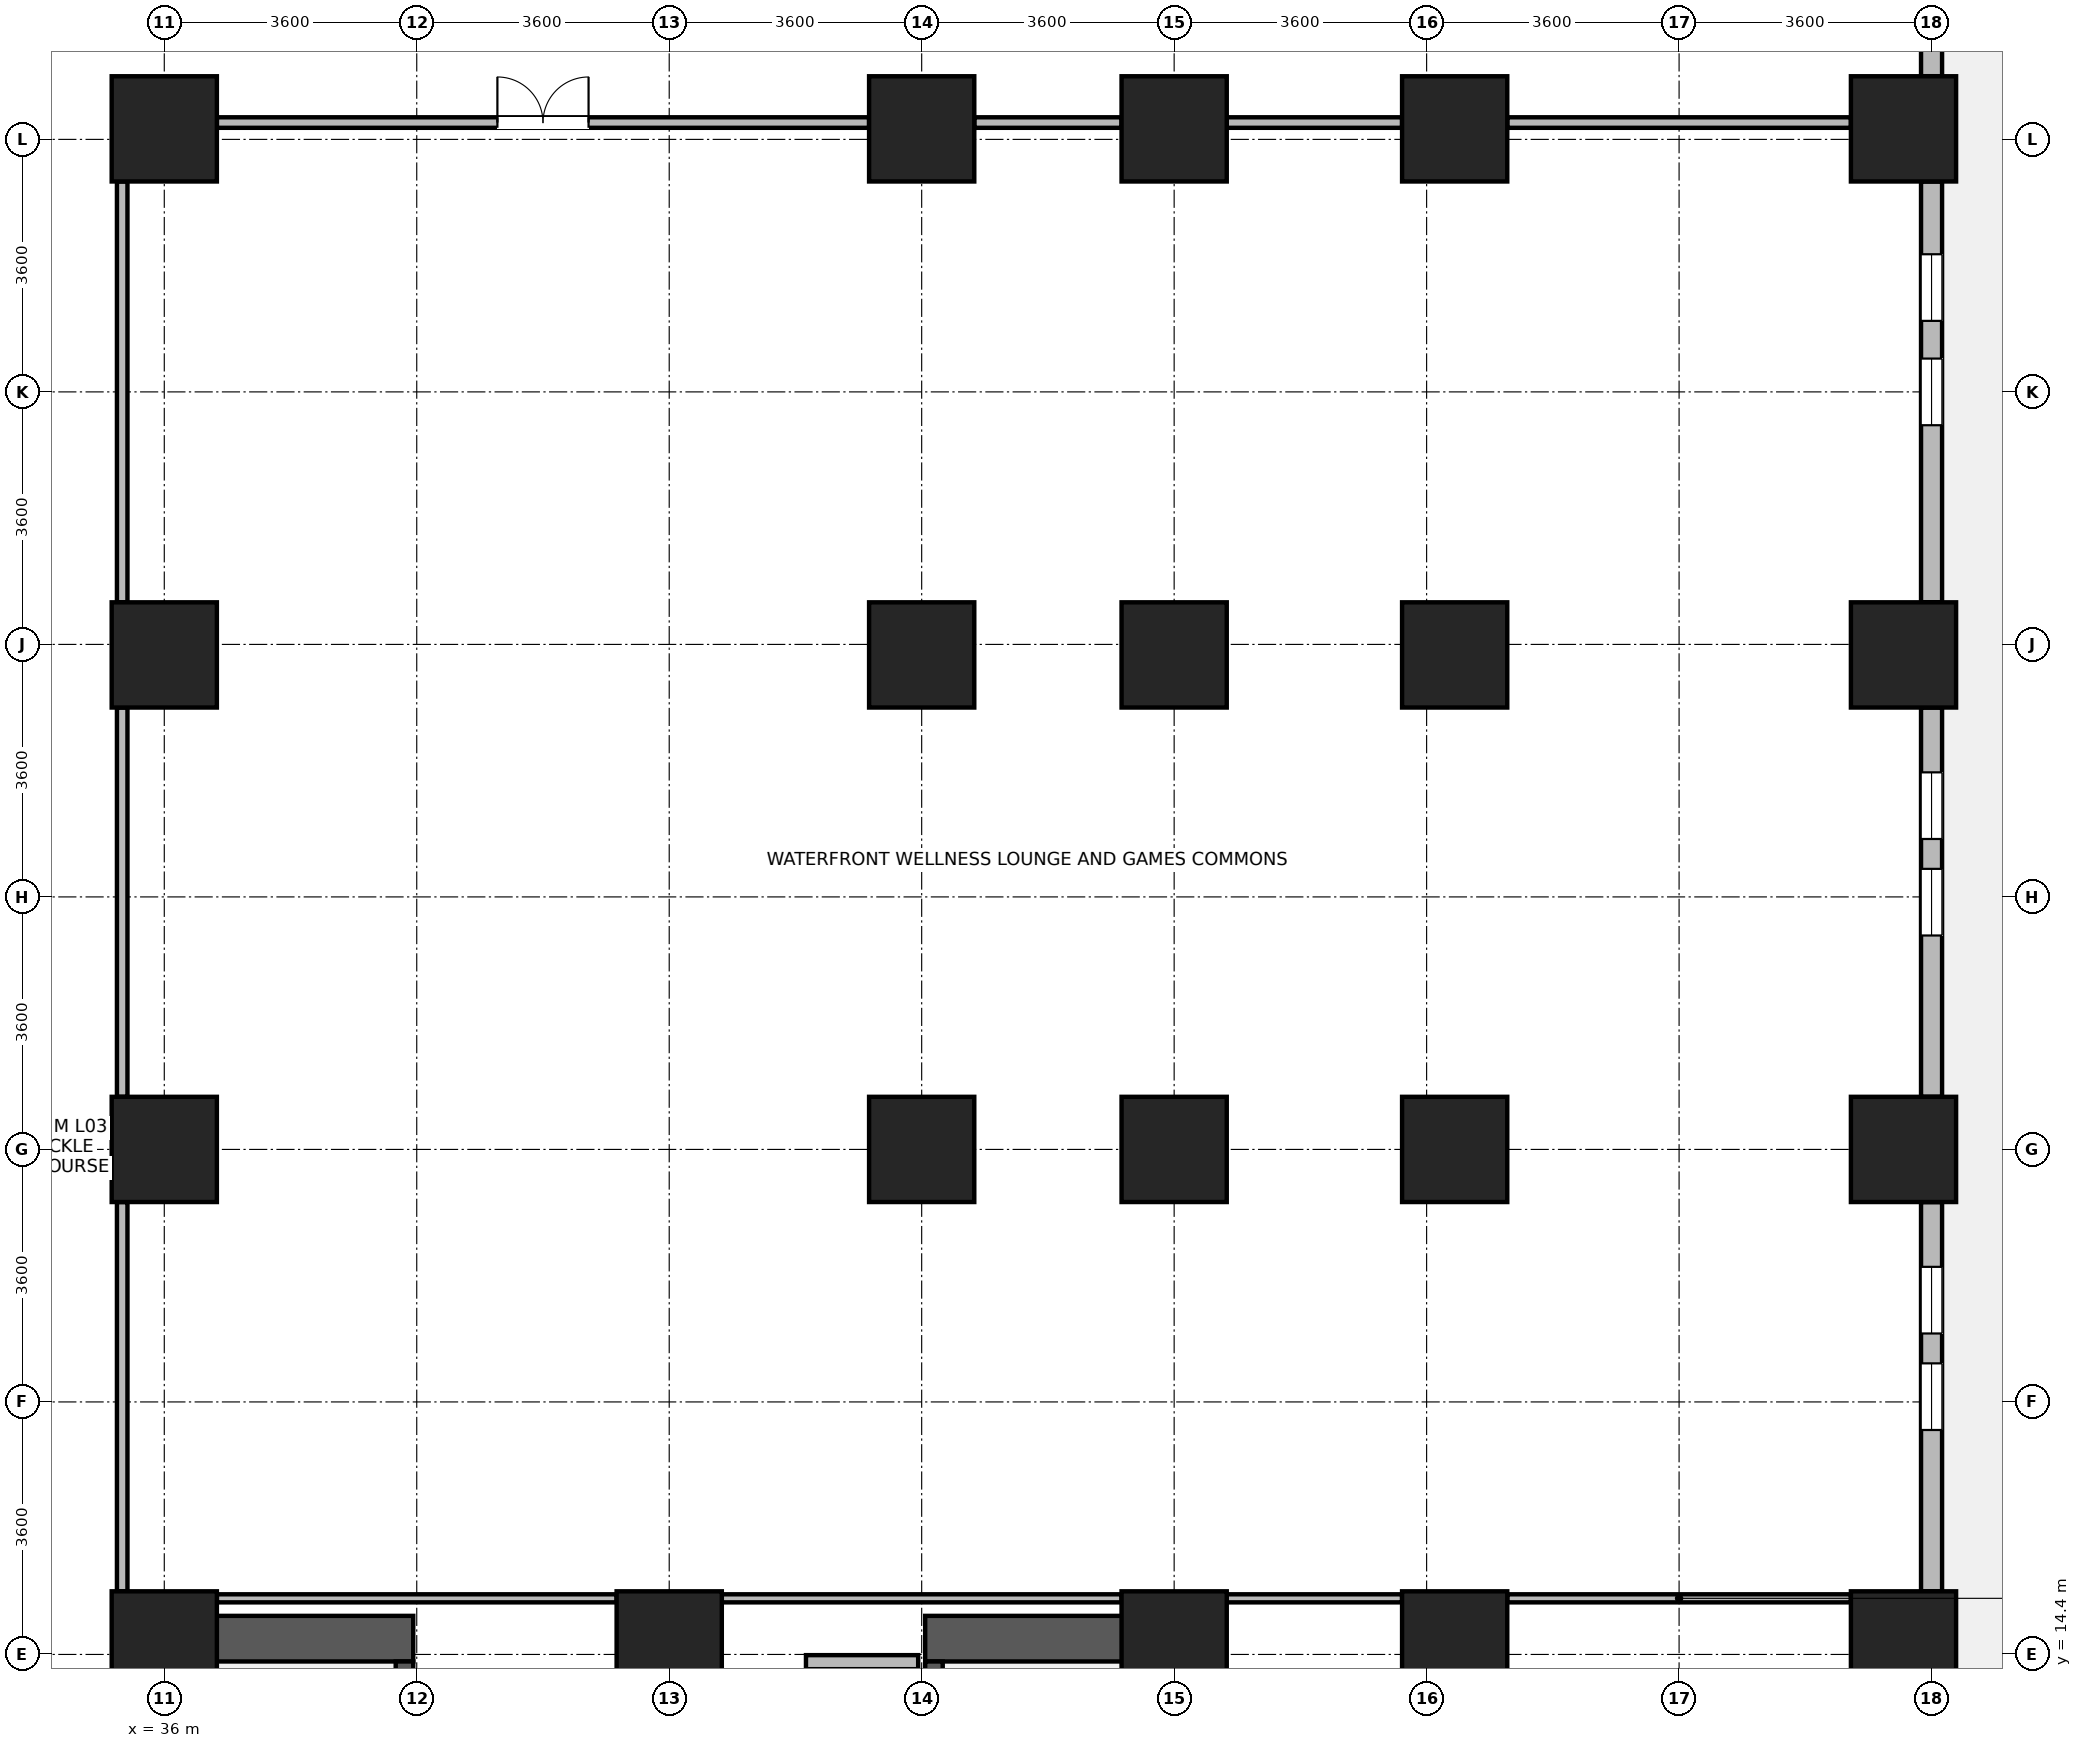
"""IFC4 building model, lengths in metres.
Left out: names, types, materials, properties, quantities, classifications, styles, units other than length and angle.
Written with IfcOpenShell. Run it as: python <this file> out.ifc"""

import sys

from ifc_helpers import new_model, si_unit, direction, frame, frame_2d, origin, origin_2d, place, context, subcontext, project, spatial, rectangle, extrude, source, transform, mapped, element, fill, save


model = new_model("IFC4")
c1 = context("Model", 3, precision=1e-05, world=origin(), true_north=direction((0.0, 1.0)))
c2 = subcontext(c1, "Body", "Model", "MODEL_VIEW")
j1 = project(units=[si_unit("LENGTHUNIT", "METRE"), si_unit("PLANEANGLEUNIT", "RADIAN")], contexts=[c1])
p1 = place(None, origin())
s1 = spatial("IfcSite", under=j1, at=p1, CompositionType="ELEMENT")
p2 = place(p1, origin())
s2 = spatial("IfcBuilding", under=s1, at=p2, CompositionType="ELEMENT")
p3 = place(p2, frame((0.0, 0.0, 15.0)))
s3 = spatial("IfcBuildingStorey", under=s2, at=p3, CompositionType="ELEMENT", Elevation=15.0)
for number, where, z_axis, x_axis in (
    (1, (36.025, 6.65, 0.0), (0.0, 0.0, 1.0), (0.0, 1.0, 0.0)),
    (2, (50.375, 6.65, 0.0), (0.0, 0.0, 1.0), (0.0, 1.0, 0.0)),
):
    element("IfcWall", number, at=place(p3, frame(where, z_axis=z_axis, x_axis=x_axis)), inside=s3, PredefinedType="SHEAR", context=c2, shape_type="SweptSolid", body=[
        extrude(rectangle(XDim=8.3, YDim=0.65, at=frame_2d((4.15, 0.0))), origin(), (0.0, 0.0, 1.0), 4.38),
    ])
for number, where, z_axis, x_axis in (
    (3, (36.35, 14.625, 0.0), (0.0, 0.0, 1.0), (1.0, 0.0, 0.0)),
    (4, (46.85, 14.625, 0.0), (0.0, 0.0, 1.0), (1.0, 0.0, 0.0)),
):
    element("IfcWall", number, at=place(p3, frame(where, z_axis=z_axis, x_axis=x_axis)), inside=s3, PredefinedType="SHEAR", context=c2, shape_type="SweptSolid", body=[
        extrude(rectangle(XDim=3.2, YDim=0.65, at=frame_2d((1.6, 0.0))), origin(), (0.0, 0.0, 1.0), 4.38),
    ])
p4 = place(p3, frame((39.425, 7.3, 0.0), z_axis=(0.0, 0.0, 1.0), x_axis=(0.0, 1.0, 0.0)))
e5 = element("IfcWall", 5, at=p4, inside=s3, PredefinedType="SHEAR", context=c2, shape_type="SweptSolid", body=[
    extrude(rectangle(XDim=7.0, YDim=0.25, at=frame_2d((3.5, 0.0))), origin(), (0.0, 0.0, 1.0), 4.38),
])
p5 = place(p4, frame((0.15, 0.0, 0.0)))
e6 = element("IfcOpeningElement", 6, at=p5, cuts=e5, PredefinedType="OPENING", context=c2, shape_type="SweptSolid", body=[
    extrude(rectangle(XDim=1.1, YDim=2.08, at=frame_2d((0.55, 1.04))), frame((0.0, 0.135, 0.0), z_axis=(0.0, -1.0, 0.0), x_axis=(1.0, 0.0, 0.0)), (0.0, 0.0, 1.0), 0.27),
])
p6 = place(p3, frame((46.975, 7.3, 0.0), z_axis=(0.0, 0.0, 1.0), x_axis=(0.0, 1.0, 0.0)))
e7 = element("IfcWall", 7, at=p6, inside=s3, PredefinedType="SHEAR", context=c2, shape_type="SweptSolid", body=[
    extrude(rectangle(XDim=7.0, YDim=0.25, at=frame_2d((3.5, 0.0))), origin(), (0.0, 0.0, 1.0), 4.38),
])
p7 = place(p6, frame((0.15, 0.0, 0.0)))
e8 = element("IfcOpeningElement", 8, at=p7, cuts=e7, PredefinedType="OPENING", context=c2, shape_type="SweptSolid", body=[
    extrude(rectangle(XDim=1.1, YDim=2.08, at=frame_2d((0.55, 1.04))), frame((0.0, 0.135, 0.0), z_axis=(0.0, -1.0, 0.0), x_axis=(1.0, 0.0, 0.0)), (0.0, 0.0, 1.0), 0.27),
])
m1 = source(origin(), c2, "Body", "SweptSolid", [
    extrude(rectangle(XDim=1.5, YDim=1.5, at=origin_2d()), origin(), (0.0, 0.0, 1.0), 4.8),
])
for number, where, z_axis, x_axis in (
    (9, (36.0, 21.6, 0.0), (0.0, 0.0, 1.0), (1.0, 0.0, 0.0)),
    (10, (36.0, 28.65, 0.0), (0.0, 0.0, 1.0), (1.0, 0.0, 0.0)),
    (11, (36.0, 36.15, 0.0), (0.0, 0.0, 1.0), (1.0, 0.0, 0.0)),
    (12, (46.8, 21.6, 0.0), (0.0, 0.0, 1.0), (1.0, 0.0, 0.0)),
    (13, (46.8, 28.65, 0.0), (0.0, 0.0, 1.0), (1.0, 0.0, 0.0)),
    (14, (46.8, 36.15, 0.0), (0.0, 0.0, 1.0), (1.0, 0.0, 0.0)),
    (15, (36.0, 14.55, 0.0), (0.0, 0.0, 1.0), (1.0, 0.0, 0.0)),
    (16, (43.2, 14.55, 0.0), (0.0, 0.0, 1.0), (1.0, 0.0, 0.0)),
    (17, (50.4, 14.55, 0.0), (0.0, 0.0, 1.0), (1.0, 0.0, 0.0)),
    (18, (50.4, 21.6, 0.0), (0.0, 0.0, 1.0), (1.0, 0.0, 0.0)),
    (19, (50.4, 28.65, 0.0), (0.0, 0.0, 1.0), (1.0, 0.0, 0.0)),
    (20, (50.4, 36.15, 0.0), (0.0, 0.0, 1.0), (1.0, 0.0, 0.0)),
    (21, (54.4, 14.55, 0.0), (0.0, 0.0, 1.0), (1.0, 0.0, 0.0)),
    (22, (54.4, 21.6, 0.0), (0.0, 0.0, 1.0), (1.0, 0.0, 0.0)),
    (23, (54.4, 28.65, 0.0), (0.0, 0.0, 1.0), (1.0, 0.0, 0.0)),
    (24, (54.4, 36.15, 0.0), (0.0, 0.0, 1.0), (1.0, 0.0, 0.0)),
    (25, (60.8, 36.15, 0.0), (0.0, 0.0, 1.0), (1.0, 0.0, 0.0)),
    (26, (60.8, 28.65, 0.0), (0.0, 0.0, 1.0), (1.0, 0.0, 0.0)),
    (27, (60.8, 21.6, 0.0), (0.0, 0.0, 1.0), (1.0, 0.0, 0.0)),
    (28, (60.8, 14.55, 0.0), (0.0, 0.0, 1.0), (1.0, 0.0, 0.0)),
):
    element("IfcColumn", number, at=place(p3, frame(where, z_axis=z_axis, x_axis=x_axis)), inside=s3, PredefinedType="COLUMN", context=c2, shape_type="MappedRepresentation", body=[
        mapped(m1, transform((0.0, 0.0, 0.0), x_axis=(1.0, 0.0, 0.0), y_axis=(0.0, 1.0, 0.0), z_axis=(0.0, 0.0, 1.0), scale=1.0)),
    ])
p8 = place(p3, frame((61.2, 20.849, 0.0), z_axis=(0.0, 0.0, 1.0), x_axis=(0.0, -1.0, 0.0)))
e29 = element("IfcWall", 29, at=p8, inside=s3, PredefinedType="STANDARD", context=c2, shape_type="SweptSolid", body=[
    extrude(rectangle(XDim=5.548, YDim=0.3, at=frame_2d((2.774, 0.0))), origin(), (0.0, 0.0, 1.0), 4.36),
])
p9 = place(p8, frame((2.299, 0.0, 0.9)))
e30 = element("IfcOpeningElement", 30, at=p9, cuts=e29, PredefinedType="OPENING", context=c2, shape_type="SweptSolid", body=[
    extrude(rectangle(XDim=0.95, YDim=1.75, at=frame_2d((0.475, 0.875))), frame((0.0, 0.16, 0.0), z_axis=(0.0, -1.0, 0.0), x_axis=(1.0, 0.0, 0.0)), (0.0, 0.0, 1.0), 0.32),
])
p10 = place(p8, frame((0.923, 0.0, 0.9)))
e31 = element("IfcOpeningElement", 31, at=p10, cuts=e29, PredefinedType="OPENING", context=c2, shape_type="SweptSolid", body=[
    extrude(rectangle(XDim=0.95, YDim=1.75, at=frame_2d((0.475, 0.875))), frame((0.0, 0.16, 0.0), z_axis=(0.0, -1.0, 0.0), x_axis=(1.0, 0.0, 0.0)), (0.0, 0.0, 1.0), 0.32),
])
p11 = place(p3, frame((61.2, 27.899, 0.0), z_axis=(0.0, 0.0, 1.0), x_axis=(0.0, -1.0, 0.0)))
e32 = element("IfcWall", 32, at=p11, inside=s3, PredefinedType="STANDARD", context=c2, shape_type="SweptSolid", body=[
    extrude(rectangle(XDim=5.548, YDim=0.3, at=frame_2d((2.774, 0.0))), origin(), (0.0, 0.0, 1.0), 4.36),
])
p12 = place(p11, frame((2.299, 0.0, 0.9)))
e33 = element("IfcOpeningElement", 33, at=p12, cuts=e32, PredefinedType="OPENING", context=c2, shape_type="SweptSolid", body=[
    extrude(rectangle(XDim=0.95, YDim=1.75, at=frame_2d((0.475, 0.875))), frame((0.0, 0.16, 0.0), z_axis=(0.0, -1.0, 0.0), x_axis=(1.0, 0.0, 0.0)), (0.0, 0.0, 1.0), 0.32),
])
p13 = place(p11, frame((0.923, 0.0, 0.9)))
e34 = element("IfcOpeningElement", 34, at=p13, cuts=e32, PredefinedType="OPENING", context=c2, shape_type="SweptSolid", body=[
    extrude(rectangle(XDim=0.95, YDim=1.75, at=frame_2d((0.475, 0.875))), frame((0.0, 0.16, 0.0), z_axis=(0.0, -1.0, 0.0), x_axis=(1.0, 0.0, 0.0)), (0.0, 0.0, 1.0), 0.32),
])
p14 = place(p3, frame((61.2, 35.399, 0.0), z_axis=(0.0, 0.0, 1.0), x_axis=(0.0, -1.0, 0.0)))
e35 = element("IfcWall", 35, at=p14, inside=s3, PredefinedType="STANDARD", context=c2, shape_type="SweptSolid", body=[
    extrude(rectangle(XDim=5.998, YDim=0.3, at=frame_2d((2.999, 0.0))), origin(), (0.0, 0.0, 1.0), 4.36),
])
p15 = place(p14, frame((2.524, 0.0, 0.9)))
e36 = element("IfcOpeningElement", 36, at=p15, cuts=e35, PredefinedType="OPENING", context=c2, shape_type="SweptSolid", body=[
    extrude(rectangle(XDim=0.95, YDim=1.75, at=frame_2d((0.475, 0.875))), frame((0.0, 0.16, 0.0), z_axis=(0.0, -1.0, 0.0), x_axis=(1.0, 0.0, 0.0)), (0.0, 0.0, 1.0), 0.32),
])
p16 = place(p14, frame((1.037, 0.0, 0.9)))
e37 = element("IfcOpeningElement", 37, at=p16, cuts=e35, PredefinedType="OPENING", context=c2, shape_type="SweptSolid", body=[
    extrude(rectangle(XDim=0.95, YDim=1.75, at=frame_2d((0.475, 0.875))), frame((0.0, 0.16, 0.0), z_axis=(0.0, -1.0, 0.0), x_axis=(1.0, 0.0, 0.0)), (0.0, 0.0, 1.0), 0.32),
])
p17 = place(p3, frame((61.2, 44.099, 0.0), z_axis=(0.0, 0.0, 1.0), x_axis=(0.0, -1.0, 0.0)))
e38 = element("IfcWall", 38, at=p17, inside=s3, PredefinedType="STANDARD", context=c2, shape_type="SweptSolid", body=[
    extrude(rectangle(XDim=7.198, YDim=0.3, at=frame_2d((3.599, 0.0))), origin(), (0.0, 0.0, 1.0), 4.36),
])
p18 = place(p17, frame((0.6, 0.0, 0.9)))
e39 = element("IfcOpeningElement", 39, at=p18, cuts=e38, PredefinedType="OPENING", context=c2, shape_type="SweptSolid", body=[
    extrude(rectangle(XDim=2.4, YDim=2.5, at=frame_2d((1.2, 1.25))), frame((0.0, 0.16, 0.0), z_axis=(0.0, -1.0, 0.0), x_axis=(1.0, 0.0, 0.0)), (0.0, 0.0, 1.0), 0.32),
])
p19 = place(p17, frame((3.7, 0.0, 0.9)))
e40 = element("IfcOpeningElement", 40, at=p19, cuts=e38, PredefinedType="OPENING", context=c2, shape_type="SweptSolid", body=[
    extrude(rectangle(XDim=0.95, YDim=1.75, at=frame_2d((0.475, 0.875))), frame((0.0, 0.16, 0.0), z_axis=(0.0, -1.0, 0.0), x_axis=(1.0, 0.0, 0.0)), (0.0, 0.0, 1.0), 0.32),
])
p20 = place(p3, frame((45.15, 14.29, 0.0), z_axis=(0.0, 0.0, 1.0), x_axis=(1.0, 0.0, 0.0)))
e41 = element("IfcWall", 41, at=p20, inside=s3, PredefinedType="PARTITIONING", context=c2, shape_type="SweptSolid", body=[
    extrude(rectangle(XDim=1.6, YDim=0.2, at=frame_2d((0.8, 0.0))), origin(), (0.0, 0.0, 1.0), 3.16),
])
p21 = place(p3, frame((36.75, 36.24, 0.0), z_axis=(0.0, 0.0, 1.0), x_axis=(1.0, 0.0, 0.0)))
e42 = element("IfcWall", 42, at=p21, inside=s3, PredefinedType="PARTITIONING", context=c2, shape_type="SweptSolid", body=[
    extrude(rectangle(XDim=9.3, YDim=0.15, at=frame_2d((4.65, 0.0))), origin(), (0.0, 0.0, 1.0), 3.66),
])
p22 = place(p21, frame((4.0, 0.0, 0.0)))
e43 = element("IfcOpeningElement", 43, at=p22, cuts=e42, PredefinedType="OPENING", context=c2, shape_type="SweptSolid", body=[
    extrude(rectangle(XDim=1.3, YDim=2.12, at=frame_2d((0.65, 1.06))), frame((0.0, 0.085, 0.0), z_axis=(0.0, -1.0, 0.0), x_axis=(1.0, 0.0, 0.0)), (0.0, 0.0, 1.0), 0.17),
])
p23 = place(p3, frame((47.55, 36.24, 0.0), z_axis=(0.0, 0.0, 1.0), x_axis=(1.0, 0.0, 0.0)))
e44 = element("IfcWall", 44, at=p23, inside=s3, PredefinedType="PARTITIONING", context=c2, shape_type="SweptSolid", body=[
    extrude(rectangle(XDim=2.1, YDim=0.15, at=frame_2d((1.05, 0.0))), origin(), (0.0, 0.0, 1.0), 3.66),
])
p24 = place(p3, frame((51.15, 36.24, 0.0), z_axis=(0.0, 0.0, 1.0), x_axis=(1.0, 0.0, 0.0)))
e45 = element("IfcWall", 45, at=p24, inside=s3, PredefinedType="PARTITIONING", context=c2, shape_type="SweptSolid", body=[
    extrude(rectangle(XDim=2.5, YDim=0.15, at=frame_2d((1.25, 0.0))), origin(), (0.0, 0.0, 1.0), 3.66),
])
p25 = place(p3, frame((55.15, 36.24, 0.0), z_axis=(0.0, 0.0, 1.0), x_axis=(1.0, 0.0, 0.0)))
e46 = element("IfcWall", 46, at=p25, inside=s3, PredefinedType="PARTITIONING", context=c2, shape_type="SweptSolid", body=[
    extrude(rectangle(XDim=4.9, YDim=0.15, at=frame_2d((2.45, 0.0))), origin(), (0.0, 0.0, 1.0), 3.66),
])
p26 = place(p3, frame((35.4, 15.3, 0.0), z_axis=(0.0, 0.0, 1.0), x_axis=(0.0, 1.0, 0.0)))
e47 = element("IfcWall", 47, at=p26, inside=s3, PredefinedType="PARTITIONING", context=c2, shape_type="SweptSolid", body=[
    extrude(rectangle(XDim=5.55, YDim=0.15, at=frame_2d((2.775, 0.0))), origin(), (0.0, 0.0, 1.0), 4.36),
])
p27 = place(p3, frame((35.4, 22.35, 0.0), z_axis=(0.0, 0.0, 1.0), x_axis=(0.0, 1.0, 0.0)))
e48 = element("IfcWall", 48, at=p27, inside=s3, PredefinedType="PARTITIONING", context=c2, shape_type="SweptSolid", body=[
    extrude(rectangle(XDim=5.55, YDim=0.15, at=frame_2d((2.775, 0.0))), origin(), (0.0, 0.0, 1.0), 4.36),
])
p28 = place(p3, frame((35.4, 29.4, 0.0), z_axis=(0.0, 0.0, 1.0), x_axis=(0.0, 1.0, 0.0)))
e49 = element("IfcWall", 49, at=p28, inside=s3, PredefinedType="PARTITIONING", context=c2, shape_type="SweptSolid", body=[
    extrude(rectangle(XDim=6.0, YDim=0.15, at=frame_2d((3.0, 0.0))), origin(), (0.0, 0.0, 1.0), 4.36),
])
for number, where, z_axis, x_axis in (
    (50, (36.75, 15.2, 0.0), (0.0, 0.0, 1.0), (1.0, 0.0, 0.0)),
    (51, (43.95, 15.2, 0.0), (0.0, 0.0, 1.0), (1.0, 0.0, 0.0)),
):
    element("IfcWall", number, at=place(p3, frame(where, z_axis=z_axis, x_axis=x_axis)), inside=s3, PredefinedType="PARTITIONING", context=c2, shape_type="SweptSolid", body=[
        extrude(rectangle(XDim=5.7, YDim=0.115, at=frame_2d((2.85, 0.0))), origin(), (0.0, 0.0, 1.0), 4.36),
    ])
p29 = place(p3, frame((51.15, 15.2, 0.0), z_axis=(0.0, 0.0, 1.0), x_axis=(1.0, 0.0, 0.0)))
e52 = element("IfcWall", 52, at=p29, inside=s3, PredefinedType="PARTITIONING", context=c2, shape_type="SweptSolid", body=[
    extrude(rectangle(XDim=2.5, YDim=0.115, at=frame_2d((1.25, 0.0))), origin(), (0.0, 0.0, 1.0), 4.36),
])
p30 = place(p3, frame((55.15, 15.2, 0.0), z_axis=(0.0, 0.0, 1.0), x_axis=(1.0, 0.0, 0.0)))
e53 = element("IfcWall", 53, at=p30, inside=s3, PredefinedType="PARTITIONING", context=c2, shape_type="SweptSolid", body=[
    extrude(rectangle(XDim=4.9, YDim=0.115, at=frame_2d((2.45, 0.0))), origin(), (0.0, 0.0, 1.0), 4.36),
])
p31 = place(p9, origin())
e54 = element("IfcWindow", 54, at=p31, inside=s3, PartitioningType="SINGLE_PANEL", PredefinedType="WINDOW", context=c2, shape_type="SweptSolid", body=[
    extrude(rectangle(XDim=0.95, YDim=1.75, at=frame_2d((0.475, 0.875))), frame((0.0, 0.03, 0.0), z_axis=(0.0, -1.0, 0.0), x_axis=(1.0, 0.0, 0.0)), (0.0, 0.0, 1.0), 0.06),
])
fill(e30, e54)
p32 = place(p10, origin())
e55 = element("IfcWindow", 55, at=p32, inside=s3, PartitioningType="SINGLE_PANEL", PredefinedType="WINDOW", context=c2, shape_type="SweptSolid", body=[
    extrude(rectangle(XDim=0.95, YDim=1.75, at=frame_2d((0.475, 0.875))), frame((0.0, 0.03, 0.0), z_axis=(0.0, -1.0, 0.0), x_axis=(1.0, 0.0, 0.0)), (0.0, 0.0, 1.0), 0.06),
])
fill(e31, e55)
p33 = place(p12, origin())
e56 = element("IfcWindow", 56, at=p33, inside=s3, PartitioningType="SINGLE_PANEL", PredefinedType="WINDOW", context=c2, shape_type="SweptSolid", body=[
    extrude(rectangle(XDim=0.95, YDim=1.75, at=frame_2d((0.475, 0.875))), frame((0.0, 0.03, 0.0), z_axis=(0.0, -1.0, 0.0), x_axis=(1.0, 0.0, 0.0)), (0.0, 0.0, 1.0), 0.06),
])
fill(e33, e56)
p34 = place(p13, origin())
e57 = element("IfcWindow", 57, at=p34, inside=s3, PartitioningType="SINGLE_PANEL", PredefinedType="WINDOW", context=c2, shape_type="SweptSolid", body=[
    extrude(rectangle(XDim=0.95, YDim=1.75, at=frame_2d((0.475, 0.875))), frame((0.0, 0.03, 0.0), z_axis=(0.0, -1.0, 0.0), x_axis=(1.0, 0.0, 0.0)), (0.0, 0.0, 1.0), 0.06),
])
fill(e34, e57)
p35 = place(p15, origin())
e58 = element("IfcWindow", 58, at=p35, inside=s3, PartitioningType="SINGLE_PANEL", PredefinedType="WINDOW", context=c2, shape_type="SweptSolid", body=[
    extrude(rectangle(XDim=0.95, YDim=1.75, at=frame_2d((0.475, 0.875))), frame((0.0, 0.03, 0.0), z_axis=(0.0, -1.0, 0.0), x_axis=(1.0, 0.0, 0.0)), (0.0, 0.0, 1.0), 0.06),
])
fill(e36, e58)
p36 = place(p16, origin())
e59 = element("IfcWindow", 59, at=p36, inside=s3, PartitioningType="SINGLE_PANEL", PredefinedType="WINDOW", context=c2, shape_type="SweptSolid", body=[
    extrude(rectangle(XDim=0.95, YDim=1.75, at=frame_2d((0.475, 0.875))), frame((0.0, 0.03, 0.0), z_axis=(0.0, -1.0, 0.0), x_axis=(1.0, 0.0, 0.0)), (0.0, 0.0, 1.0), 0.06),
])
fill(e37, e59)
p37 = place(p22, origin())
e60 = element("IfcDoor", 60, at=p37, inside=s3, OperationType="DOUBLE_DOOR_SINGLE_SWING", PredefinedType="DOOR", context=c2, shape_type="SweptSolid", body=[
    extrude(rectangle(XDim=1.3, YDim=2.12, at=frame_2d((0.65, 1.06))), frame((0.0, 0.025, 0.0), z_axis=(0.0, -1.0, 0.0), x_axis=(1.0, 0.0, 0.0)), (0.0, 0.0, 1.0), 0.05),
])
fill(e43, e60)
save(model, sys.argv[1])
